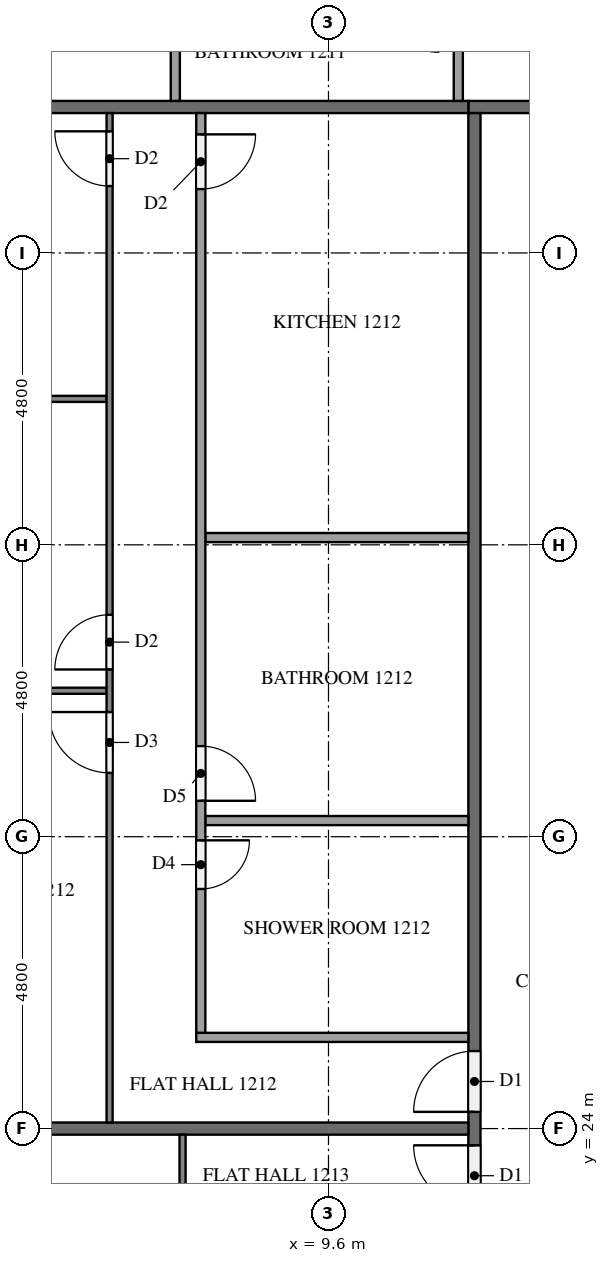
"""IFC4 building model, lengths in metres.
Left out: names, types, materials, properties, quantities, classifications, styles, units other than length and angle.
Written with IfcOpenShell. Run it as: python <this file> out.ifc"""

import sys

from ifc_helpers import new_model, si_unit, direction, frame, frame_2d, origin, place, context, subcontext, project, spatial, rectangle, extrude, element, fill, save


model = new_model("IFC4")
c1 = context("Model", 3, precision=1e-05, world=origin(), true_north=direction((0.0, 1.0)))
c2 = subcontext(c1, "Body", "Model", "MODEL_VIEW")
j1 = project(units=[si_unit("LENGTHUNIT", "METRE"), si_unit("PLANEANGLEUNIT", "RADIAN")], contexts=[c1])
p1 = place(None, origin())
s1 = spatial("IfcSite", under=j1, at=p1, CompositionType="ELEMENT")
p2 = place(p1, origin())
s2 = spatial("IfcBuilding", under=s1, at=p2, CompositionType="ELEMENT")
p3 = place(p2, frame((0.0, 0.0, 50.4)))
s3 = spatial("IfcBuildingStorey", under=s2, at=p3, CompositionType="ELEMENT", Elevation=50.4)
p4 = place(p3, frame((11.9, 40.8, 0.0), z_axis=(0.0, 0.0, 1.0), x_axis=(1.0, 0.0, 0.0)))
e1 = element("IfcWall", 1, at=p4, inside=s3, PredefinedType="PARTITIONING", context=c2, shape_type="SweptSolid", body=[
    extrude(rectangle(XDim=38.6, YDim=0.2, at=frame_2d((19.3, 0.0))), origin(), (0.0, 0.0, 1.0), 3.1),
])
p5 = place(p4, frame((33.975, 0.0, 0.0)))
e2 = element("IfcOpeningElement", 2, at=p5, cuts=e1, PredefinedType="OPENING", context=c2, shape_type="SweptSolid", body=[
    extrude(rectangle(XDim=1.0, YDim=2.1, at=frame_2d((0.5, 1.05))), frame((0.0, 0.11, 0.0), z_axis=(0.0, -1.0, 0.0), x_axis=(1.0, 0.0, 0.0)), (0.0, 0.0, 1.0), 0.22),
])
p6 = place(p4, frame((19.575, 0.0, 0.0)))
e3 = element("IfcOpeningElement", 3, at=p6, cuts=e1, PredefinedType="OPENING", context=c2, shape_type="SweptSolid", body=[
    extrude(rectangle(XDim=1.0, YDim=2.1, at=frame_2d((0.5, 1.05))), frame((0.0, 0.11, 0.0), z_axis=(0.0, -1.0, 0.0), x_axis=(1.0, 0.0, 0.0)), (0.0, 0.0, 1.0), 0.22),
])
p7 = place(p4, frame((18.025, 0.0, 0.0)))
e4 = element("IfcOpeningElement", 4, at=p7, cuts=e1, PredefinedType="OPENING", context=c2, shape_type="SweptSolid", body=[
    extrude(rectangle(XDim=1.0, YDim=2.1, at=frame_2d((0.5, 1.05))), frame((0.0, 0.11, 0.0), z_axis=(0.0, -1.0, 0.0), x_axis=(1.0, 0.0, 0.0)), (0.0, 0.0, 1.0), 0.22),
])
p8 = place(p4, frame((3.625, 0.0, 0.0)))
e5 = element("IfcOpeningElement", 5, at=p8, cuts=e1, PredefinedType="OPENING", context=c2, shape_type="SweptSolid", body=[
    extrude(rectangle(XDim=1.0, YDim=2.1, at=frame_2d((0.5, 1.05))), frame((0.0, 0.11, 0.0), z_axis=(0.0, -1.0, 0.0), x_axis=(1.0, 0.0, 0.0)), (0.0, 0.0, 1.0), 0.22),
])
p9 = place(p3, frame((12.0, 12.1, 0.0), z_axis=(0.0, 0.0, 1.0), x_axis=(0.0, 1.0, 0.0)))
e6 = element("IfcWall", 6, at=p9, inside=s3, PredefinedType="PARTITIONING", context=c2, shape_type="SweptSolid", body=[
    extrude(rectangle(XDim=28.6, YDim=0.2, at=frame_2d((14.3, 0.0))), origin(), (0.0, 0.0, 1.0), 3.1),
])
p10 = place(p9, frame((12.175, 0.0, 0.0)))
e7 = element("IfcOpeningElement", 7, at=p10, cuts=e6, PredefinedType="OPENING", context=c2, shape_type="SweptSolid", body=[
    extrude(rectangle(XDim=1.0, YDim=2.1, at=frame_2d((0.5, 1.05))), frame((0.0, 0.11, 0.0), z_axis=(0.0, -1.0, 0.0), x_axis=(1.0, 0.0, 0.0)), (0.0, 0.0, 1.0), 0.22),
])
p11 = place(p9, frame((10.625, 0.0, 0.0)))
e8 = element("IfcOpeningElement", 8, at=p11, cuts=e6, PredefinedType="OPENING", context=c2, shape_type="SweptSolid", body=[
    extrude(rectangle(XDim=1.0, YDim=2.1, at=frame_2d((0.5, 1.05))), frame((0.0, 0.11, 0.0), z_axis=(0.0, -1.0, 0.0), x_axis=(1.0, 0.0, 0.0)), (0.0, 0.0, 1.0), 0.22),
])
p12 = place(p3, frame((0.1, 40.8, 0.0), z_axis=(0.0, 0.0, 1.0), x_axis=(1.0, 0.0, 0.0)))
e9 = element("IfcWall", 9, at=p12, inside=s3, PredefinedType="PARTITIONING", context=c2, shape_type="SweptSolid", body=[
    extrude(rectangle(XDim=11.8, YDim=0.2, at=frame_2d((5.9, 0.0))), origin(), (0.0, 0.0, 1.0), 3.1),
])
p13 = place(p3, frame((0.45, 24.0, 0.0), z_axis=(0.0, 0.0, 1.0), x_axis=(1.0, 0.0, 0.0)))
e10 = element("IfcWall", 10, at=p13, inside=s3, PredefinedType="PARTITIONING", context=c2, shape_type="SweptSolid", body=[
    extrude(rectangle(XDim=11.45, YDim=0.2, at=frame_2d((5.725, 0.0))), origin(), (0.0, 0.0, 1.0), 3.1),
])
for number, where, z_axis, x_axis in (
    (11, (11.735, 40.9, 0.0), (0.0, 0.0, 1.0), (0.0, 1.0, 0.0)),
    (12, (7.081, 40.9, 0.0), (0.0, 0.0, 1.0), (0.0, 1.0, 0.0)),
):
    element("IfcWall", number, at=place(p3, frame(where, z_axis=z_axis, x_axis=x_axis)), inside=s3, PredefinedType="PARTITIONING", context=c2, shape_type="SweptSolid", body=[
        extrude(rectangle(XDim=1.625, YDim=0.15, at=frame_2d((0.812, 0.0))), origin(), (0.0, 0.0, 1.0), 3.1),
    ])
for number, where, z_axis, x_axis in (
    (13, (5.95, 31.2, 0.0), (0.0, 0.0, 1.0), (-1.0, 0.0, 0.0)),
    (14, (5.95, 36.0, 0.0), (0.0, 0.0, 1.0), (-1.0, 0.0, 0.0)),
):
    element("IfcWall", number, at=place(p3, frame(where, z_axis=z_axis, x_axis=x_axis)), inside=s3, PredefinedType="PARTITIONING", context=c2, shape_type="SweptSolid", body=[
        extrude(rectangle(XDim=5.85, YDim=0.1, at=frame_2d((2.925, 0.0))), origin(), (0.0, 0.0, 1.0), 3.1),
    ])
p14 = place(p3, frame((6.0, 24.1, 0.0), z_axis=(0.0, 0.0, 1.0), x_axis=(0.0, 1.0, 0.0)))
e15 = element("IfcWall", 15, at=p14, inside=s3, PredefinedType="PARTITIONING", context=c2, shape_type="SweptSolid", body=[
    extrude(rectangle(XDim=16.6, YDim=0.1, at=frame_2d((8.3, 0.0))), origin(), (0.0, 0.0, 1.0), 3.1),
])
p15 = place(p14, frame((5.75, 0.0, 0.0)))
e16 = element("IfcOpeningElement", 16, at=p15, cuts=e15, PredefinedType="OPENING", context=c2, shape_type="SweptSolid", body=[
    extrude(rectangle(XDim=1.0, YDim=2.1, at=frame_2d((0.5, 1.05))), frame((0.0, 0.06, 0.0), z_axis=(0.0, -1.0, 0.0), x_axis=(1.0, 0.0, 0.0)), (0.0, 0.0, 1.0), 0.12),
])
p16 = place(p14, frame((7.45, 0.0, 0.0)))
e17 = element("IfcOpeningElement", 17, at=p16, cuts=e15, PredefinedType="OPENING", context=c2, shape_type="SweptSolid", body=[
    extrude(rectangle(XDim=0.9, YDim=2.1, at=frame_2d((0.45, 1.05))), frame((0.0, 0.06, 0.0), z_axis=(0.0, -1.0, 0.0), x_axis=(1.0, 0.0, 0.0)), (0.0, 0.0, 1.0), 0.12),
])
p17 = place(p14, frame((15.4, 0.0, 0.0)))
e18 = element("IfcOpeningElement", 18, at=p17, cuts=e15, PredefinedType="OPENING", context=c2, shape_type="SweptSolid", body=[
    extrude(rectangle(XDim=0.9, YDim=2.1, at=frame_2d((0.45, 1.05))), frame((0.0, 0.06, 0.0), z_axis=(0.0, -1.0, 0.0), x_axis=(1.0, 0.0, 0.0)), (0.0, 0.0, 1.0), 0.12),
])
for number, where, z_axis, x_axis in (
    (19, (11.9, 29.065, 0.0), (0.0, 0.0, 1.0), (-1.0, 0.0, 0.0)),
    (20, (11.9, 33.719, 0.0), (0.0, 0.0, 1.0), (-1.0, 0.0, 0.0)),
):
    element("IfcWall", number, at=place(p3, frame(where, z_axis=z_axis, x_axis=x_axis)), inside=s3, PredefinedType="PARTITIONING", context=c2, shape_type="SweptSolid", body=[
        extrude(rectangle(XDim=4.325, YDim=0.15, at=frame_2d((2.163, 0.0))), origin(), (0.0, 0.0, 1.0), 3.1),
    ])
p18 = place(p3, frame((11.9, 25.5, 0.0), z_axis=(0.0, 0.0, 1.0), x_axis=(-1.0, 0.0, 0.0)))
e21 = element("IfcWall", 21, at=p18, inside=s3, PredefinedType="PARTITIONING", context=c2, shape_type="SweptSolid", body=[
    extrude(rectangle(XDim=4.475, YDim=0.15, at=frame_2d((2.237, 0.0))), origin(), (0.0, 0.0, 1.0), 3.1),
])
p19 = place(p3, frame((7.5, 40.7, 0.0), z_axis=(0.0, 0.0, 1.0), x_axis=(0.0, -1.0, 0.0)))
e22 = element("IfcWall", 22, at=p19, inside=s3, PredefinedType="PARTITIONING", context=c2, shape_type="SweptSolid", body=[
    extrude(rectangle(XDim=15.125, YDim=0.15, at=frame_2d((7.562, 0.0))), origin(), (0.0, 0.0, 1.0), 3.1),
])
p20 = place(p19, frame((11.96, 0.0, 0.0)))
e23 = element("IfcOpeningElement", 23, at=p20, cuts=e22, PredefinedType="OPENING", context=c2, shape_type="SweptSolid", body=[
    extrude(rectangle(XDim=0.8, YDim=2.1, at=frame_2d((0.4, 1.05))), frame((0.0, 0.085, 0.0), z_axis=(0.0, -1.0, 0.0), x_axis=(1.0, 0.0, 0.0)), (0.0, 0.0, 1.0), 0.17),
])
p21 = place(p19, frame((10.41, 0.0, 0.0)))
e24 = element("IfcOpeningElement", 24, at=p21, cuts=e22, PredefinedType="OPENING", context=c2, shape_type="SweptSolid", body=[
    extrude(rectangle(XDim=0.9, YDim=2.1, at=frame_2d((0.45, 1.05))), frame((0.0, 0.085, 0.0), z_axis=(0.0, -1.0, 0.0), x_axis=(1.0, 0.0, 0.0)), (0.0, 0.0, 1.0), 0.17),
])
p22 = place(p19, frame((0.35, 0.0, 0.0)))
e25 = element("IfcOpeningElement", 25, at=p22, cuts=e22, PredefinedType="OPENING", context=c2, shape_type="SweptSolid", body=[
    extrude(rectangle(XDim=0.9, YDim=2.1, at=frame_2d((0.45, 1.05))), frame((0.0, 0.085, 0.0), z_axis=(0.0, -1.0, 0.0), x_axis=(1.0, 0.0, 0.0)), (0.0, 0.0, 1.0), 0.17),
])
p23 = place(p3, frame((7.2, 12.1, 0.0), z_axis=(0.0, 0.0, 1.0), x_axis=(0.0, 1.0, 0.0)))
e26 = element("IfcWall", 26, at=p23, inside=s3, PredefinedType="PARTITIONING", context=c2, shape_type="SweptSolid", body=[
    extrude(rectangle(XDim=11.8, YDim=0.1, at=frame_2d((5.9, 0.0))), origin(), (0.0, 0.0, 1.0), 3.1),
])
p24 = place(p23, frame((5.05, 0.0, 0.0)))
e27 = element("IfcOpeningElement", 27, at=p24, cuts=e26, PredefinedType="OPENING", context=c2, shape_type="SweptSolid", body=[
    extrude(rectangle(XDim=1.0, YDim=2.1, at=frame_2d((0.5, 1.05))), frame((0.0, 0.06, 0.0), z_axis=(0.0, -1.0, 0.0), x_axis=(1.0, 0.0, 0.0)), (0.0, 0.0, 1.0), 0.12),
])
p25 = place(p23, frame((3.45, 0.0, 0.0)))
e28 = element("IfcOpeningElement", 28, at=p25, cuts=e26, PredefinedType="OPENING", context=c2, shape_type="SweptSolid", body=[
    extrude(rectangle(XDim=0.9, YDim=2.1, at=frame_2d((0.45, 1.05))), frame((0.0, 0.06, 0.0), z_axis=(0.0, -1.0, 0.0), x_axis=(1.0, 0.0, 0.0)), (0.0, 0.0, 1.0), 0.12),
])
p26 = place(p10, origin())
e29 = element("IfcDoor", 29, at=p26, inside=s3, OperationType="SINGLE_SWING_LEFT", PredefinedType="DOOR", context=c2, shape_type="SweptSolid", body=[
    extrude(rectangle(XDim=1.0, YDim=2.1, at=frame_2d((0.5, 1.05))), frame((0.0, 0.025, 0.0), z_axis=(0.0, -1.0, 0.0), x_axis=(1.0, 0.0, 0.0)), (0.0, 0.0, 1.0), 0.05),
])
fill(e7, e29)
p27 = place(p11, origin())
e30 = element("IfcDoor", 30, at=p27, inside=s3, OperationType="SINGLE_SWING_RIGHT", PredefinedType="DOOR", context=c2, shape_type="SweptSolid", body=[
    extrude(rectangle(XDim=1.0, YDim=2.1, at=frame_2d((0.5, 1.05))), frame((0.0, 0.025, 0.0), z_axis=(0.0, -1.0, 0.0), x_axis=(1.0, 0.0, 0.0)), (0.0, 0.0, 1.0), 0.05),
])
fill(e8, e30)
p28 = place(p15, origin())
e31 = element("IfcDoor", 31, at=p28, inside=s3, OperationType="SINGLE_SWING_RIGHT", PredefinedType="DOOR", context=c2, shape_type="SweptSolid", body=[
    extrude(rectangle(XDim=1.0, YDim=2.1, at=frame_2d((0.5, 1.05))), frame((0.0, 0.025, 0.0), z_axis=(0.0, -1.0, 0.0), x_axis=(1.0, 0.0, 0.0)), (0.0, 0.0, 1.0), 0.05),
])
fill(e16, e31)
p29 = place(p16, origin())
e32 = element("IfcDoor", 32, at=p29, inside=s3, OperationType="SINGLE_SWING_LEFT", PredefinedType="DOOR", context=c2, shape_type="SweptSolid", body=[
    extrude(rectangle(XDim=0.9, YDim=2.1, at=frame_2d((0.45, 1.05))), frame((0.0, 0.025, 0.0), z_axis=(0.0, -1.0, 0.0), x_axis=(1.0, 0.0, 0.0)), (0.0, 0.0, 1.0), 0.05),
])
fill(e17, e32)
p30 = place(p17, origin())
e33 = element("IfcDoor", 33, at=p30, inside=s3, OperationType="SINGLE_SWING_RIGHT", PredefinedType="DOOR", context=c2, shape_type="SweptSolid", body=[
    extrude(rectangle(XDim=0.9, YDim=2.1, at=frame_2d((0.45, 1.05))), frame((0.0, 0.025, 0.0), z_axis=(0.0, -1.0, 0.0), x_axis=(1.0, 0.0, 0.0)), (0.0, 0.0, 1.0), 0.05),
])
fill(e18, e33)
p31 = place(p20, origin())
e34 = element("IfcDoor", 34, at=p31, inside=s3, OperationType="SINGLE_SWING_LEFT", PredefinedType="DOOR", context=c2, shape_type="SweptSolid", body=[
    extrude(rectangle(XDim=0.8, YDim=2.1, at=frame_2d((0.4, 1.05))), frame((0.0, 0.025, 0.0), z_axis=(0.0, -1.0, 0.0), x_axis=(1.0, 0.0, 0.0)), (0.0, 0.0, 1.0), 0.05),
])
fill(e23, e34)
p32 = place(p21, origin())
e35 = element("IfcDoor", 35, at=p32, inside=s3, OperationType="SINGLE_SWING_RIGHT", PredefinedType="DOOR", context=c2, shape_type="SweptSolid", body=[
    extrude(rectangle(XDim=0.9, YDim=2.1, at=frame_2d((0.45, 1.05))), frame((0.0, 0.025, 0.0), z_axis=(0.0, -1.0, 0.0), x_axis=(1.0, 0.0, 0.0)), (0.0, 0.0, 1.0), 0.05),
])
fill(e24, e35)
p33 = place(p22, origin())
e36 = element("IfcDoor", 36, at=p33, inside=s3, OperationType="SINGLE_SWING_LEFT", PredefinedType="DOOR", context=c2, shape_type="SweptSolid", body=[
    extrude(rectangle(XDim=0.9, YDim=2.1, at=frame_2d((0.45, 1.05))), frame((0.0, 0.025, 0.0), z_axis=(0.0, -1.0, 0.0), x_axis=(1.0, 0.0, 0.0)), (0.0, 0.0, 1.0), 0.05),
])
fill(e25, e36)
save(model, sys.argv[1])
